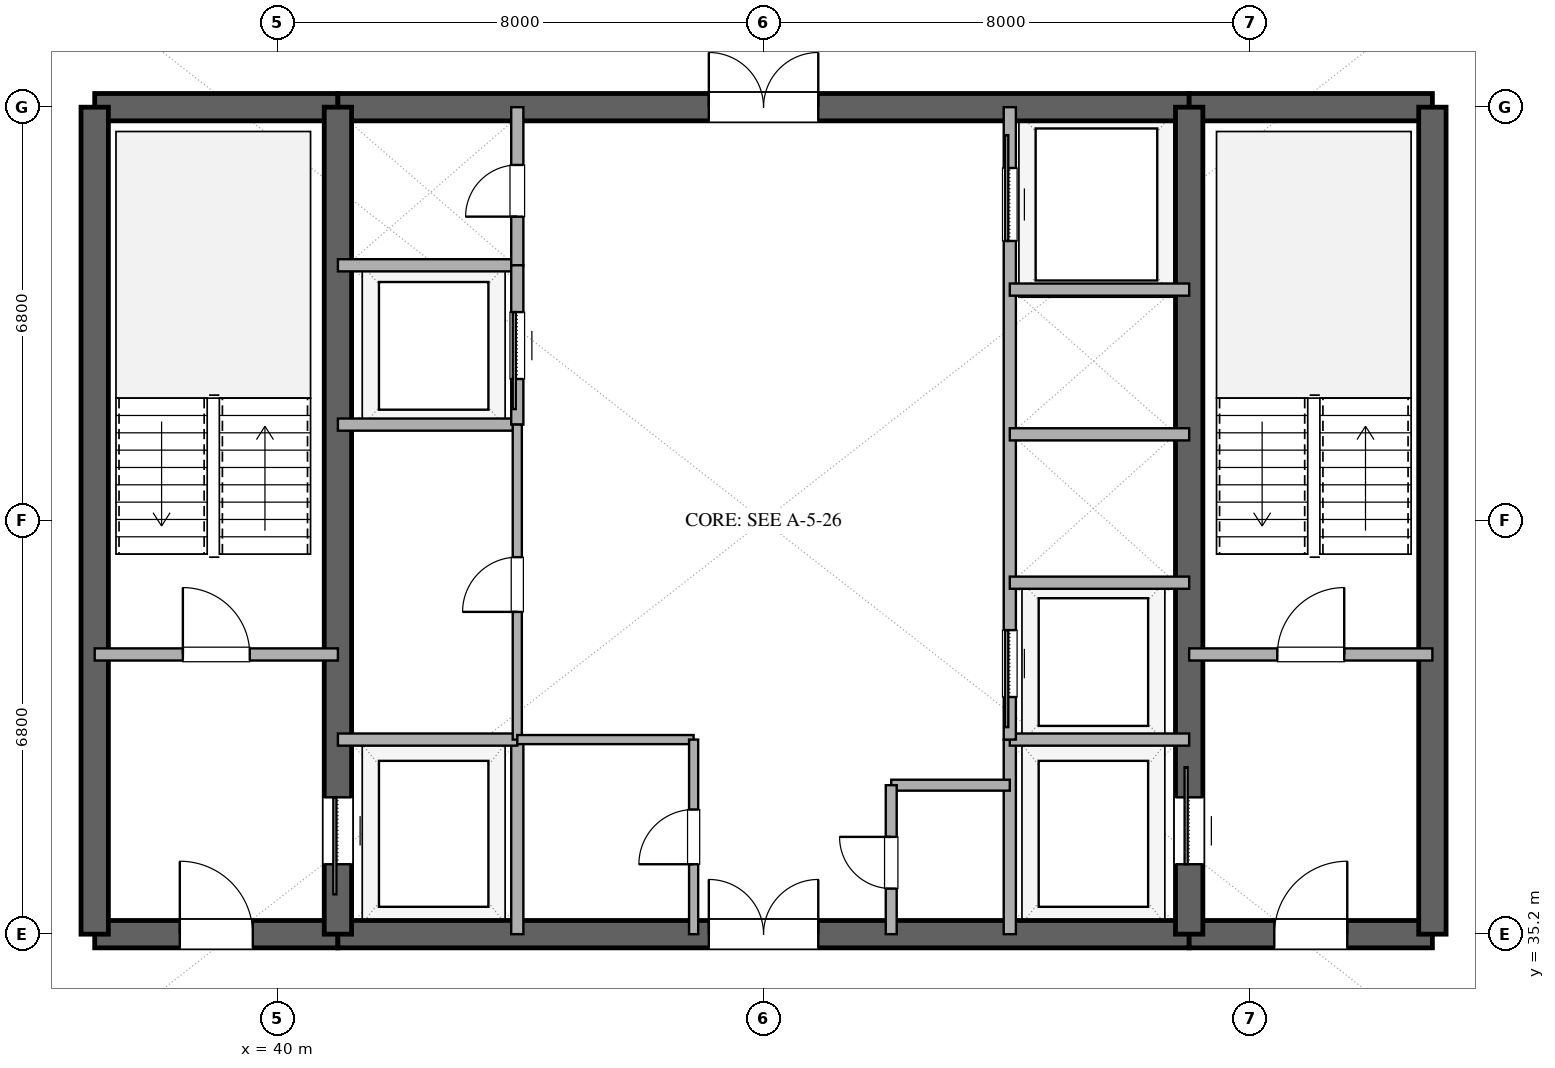
"""IFC4 building model, lengths in metres.
Left out: names, types, materials, properties, quantities, classifications, styles, units other than length and angle.
Written with IfcOpenShell. Run it as: python <this file> out.ifc"""

import sys

from ifc_helpers import new_model, si_unit, direction, frame, frame_2d, origin, place, context, subcontext, project, spatial, rectangle, extrude, element, fill, save


model = new_model("IFC4")
c1 = context("Model", 3, precision=1e-05, world=origin(), true_north=direction((0.0, 1.0)))
c2 = subcontext(c1, "Body", "Model", "MODEL_VIEW")
j1 = project(units=[si_unit("LENGTHUNIT", "METRE"), si_unit("PLANEANGLEUNIT", "RADIAN")], contexts=[c1])
p1 = place(None, origin())
s1 = spatial("IfcSite", under=j1, at=p1, CompositionType="ELEMENT")
p2 = place(p1, origin())
s2 = spatial("IfcBuilding", under=s1, at=p2, CompositionType="ELEMENT")
p3 = place(p2, frame((0.0, 0.0, 161.4)))
s3 = spatial("IfcBuildingStorey", under=s2, at=p3, CompositionType="ELEMENT", Elevation=161.4)
p4 = place(p3, frame((37.0, 35.2, 0.0), z_axis=(0.0, 0.0, 1.0), x_axis=(1.0, 0.0, 0.0)))
e1 = element("IfcWall", 1, at=p4, inside=s3, PredefinedType="SHEAR", context=c2, shape_type="SweptSolid", body=[
    extrude(rectangle(XDim=4.0, YDim=0.45, at=frame_2d((2.0, 0.0))), origin(), (0.0, 0.0, 1.0), 3.38),
])
p5 = place(p4, frame((1.4, 0.0, 0.0)))
e2 = element("IfcOpeningElement", 2, at=p5, cuts=e1, PredefinedType="OPENING", context=c2, shape_type="SweptSolid", body=[
    extrude(rectangle(XDim=1.2, YDim=2.15, at=frame_2d((0.6, 1.075))), frame((0.0, 0.235, 0.0), z_axis=(0.0, -1.0, 0.0), x_axis=(1.0, 0.0, 0.0)), (0.0, 0.0, 1.0), 0.47),
])
p6 = place(p3, frame((41.0, 35.2, 0.0), z_axis=(0.0, 0.0, 1.0), x_axis=(1.0, 0.0, 0.0)))
e3 = element("IfcWall", 3, at=p6, inside=s3, PredefinedType="SHEAR", context=c2, shape_type="SweptSolid", body=[
    extrude(rectangle(XDim=14.0, YDim=0.45, at=frame_2d((7.0, 0.0))), origin(), (0.0, 0.0, 1.0), 3.38),
])
p7 = place(p6, frame((6.1, 0.0, 0.0)))
e4 = element("IfcOpeningElement", 4, at=p7, cuts=e3, PredefinedType="OPENING", context=c2, shape_type="SweptSolid", body=[
    extrude(rectangle(XDim=1.8, YDim=2.25, at=frame_2d((0.9, 1.125))), frame((0.0, 0.235, 0.0), z_axis=(0.0, -1.0, 0.0), x_axis=(1.0, 0.0, 0.0)), (0.0, 0.0, 1.0), 0.47),
])
p8 = place(p3, frame((55.0, 35.2, 0.0), z_axis=(0.0, 0.0, 1.0), x_axis=(1.0, 0.0, 0.0)))
e5 = element("IfcWall", 5, at=p8, inside=s3, PredefinedType="SHEAR", context=c2, shape_type="SweptSolid", body=[
    extrude(rectangle(XDim=4.0, YDim=0.45, at=frame_2d((2.0, 0.0))), origin(), (0.0, 0.0, 1.0), 3.38),
])
p9 = place(p8, frame((1.4, 0.0, 0.0)))
e6 = element("IfcOpeningElement", 6, at=p9, cuts=e5, PredefinedType="OPENING", context=c2, shape_type="SweptSolid", body=[
    extrude(rectangle(XDim=1.2, YDim=2.15, at=frame_2d((0.6, 1.075))), frame((0.0, 0.235, 0.0), z_axis=(0.0, -1.0, 0.0), x_axis=(1.0, 0.0, 0.0)), (0.0, 0.0, 1.0), 0.47),
])
p10 = place(p3, frame((37.0, 48.8, 0.0), z_axis=(0.0, 0.0, 1.0), x_axis=(1.0, 0.0, 0.0)))
e7 = element("IfcWall", 7, at=p10, inside=s3, PredefinedType="SHEAR", context=c2, shape_type="SweptSolid", body=[
    extrude(rectangle(XDim=4.0, YDim=0.45, at=frame_2d((2.0, 0.0))), origin(), (0.0, 0.0, 1.0), 3.38),
])
p11 = place(p3, frame((41.0, 48.8, 0.0), z_axis=(0.0, 0.0, 1.0), x_axis=(1.0, 0.0, 0.0)))
e8 = element("IfcWall", 8, at=p11, inside=s3, PredefinedType="SHEAR", context=c2, shape_type="SweptSolid", body=[
    extrude(rectangle(XDim=14.0, YDim=0.45, at=frame_2d((7.0, 0.0))), origin(), (0.0, 0.0, 1.0), 3.38),
])
p12 = place(p11, frame((6.1, 0.0, 0.0)))
e9 = element("IfcOpeningElement", 9, at=p12, cuts=e8, PredefinedType="OPENING", context=c2, shape_type="SweptSolid", body=[
    extrude(rectangle(XDim=1.8, YDim=2.25, at=frame_2d((0.9, 1.125))), frame((0.0, 0.235, 0.0), z_axis=(0.0, -1.0, 0.0), x_axis=(1.0, 0.0, 0.0)), (0.0, 0.0, 1.0), 0.47),
])
p13 = place(p3, frame((55.0, 48.8, 0.0), z_axis=(0.0, 0.0, 1.0), x_axis=(1.0, 0.0, 0.0)))
e10 = element("IfcWall", 10, at=p13, inside=s3, PredefinedType="SHEAR", context=c2, shape_type="SweptSolid", body=[
    extrude(rectangle(XDim=4.0, YDim=0.45, at=frame_2d((2.0, 0.0))), origin(), (0.0, 0.0, 1.0), 3.38),
])
for number, where, z_axis, x_axis in (
    (11, (37.0, 35.2, 0.0), (0.0, 0.0, 1.0), (0.0, 1.0, 0.0)),
    (12, (59.0, 35.2, 0.0), (0.0, 0.0, 1.0), (0.0, 1.0, 0.0)),
):
    element("IfcWall", number, at=place(p3, frame(where, z_axis=z_axis, x_axis=x_axis)), inside=s3, PredefinedType="SHEAR", context=c2, shape_type="SweptSolid", body=[
        extrude(rectangle(XDim=13.6, YDim=0.45, at=frame_2d((6.8, 0.0))), origin(), (0.0, 0.0, 1.0), 3.38),
    ])
p14 = place(p3, frame((41.0, 35.2, 0.0), z_axis=(0.0, 0.0, 1.0), x_axis=(0.0, 1.0, 0.0)))
e13 = element("IfcWall", 13, at=p14, inside=s3, PredefinedType="SHEAR", context=c2, shape_type="SweptSolid", body=[
    extrude(rectangle(XDim=13.6, YDim=0.45, at=frame_2d((6.8, 0.0))), origin(), (0.0, 0.0, 1.0), 3.38),
])
p15 = place(p14, frame((1.15, 0.0, 0.0)))
e14 = element("IfcOpeningElement", 14, at=p15, cuts=e13, PredefinedType="OPENING", context=c2, shape_type="SweptSolid", body=[
    extrude(rectangle(XDim=1.1, YDim=2.2, at=frame_2d((0.55, 1.1))), frame((0.0, 0.235, 0.0), z_axis=(0.0, -1.0, 0.0), x_axis=(1.0, 0.0, 0.0)), (0.0, 0.0, 1.0), 0.47),
])
p16 = place(p3, frame((55.0, 35.2, 0.0), z_axis=(0.0, 0.0, 1.0), x_axis=(0.0, 1.0, 0.0)))
e15 = element("IfcWall", 15, at=p16, inside=s3, PredefinedType="SHEAR", context=c2, shape_type="SweptSolid", body=[
    extrude(rectangle(XDim=13.6, YDim=0.45, at=frame_2d((6.8, 0.0))), origin(), (0.0, 0.0, 1.0), 3.38),
])
p17 = place(p16, frame((1.15, 0.0, 0.0)))
e16 = element("IfcOpeningElement", 16, at=p17, cuts=e15, PredefinedType="OPENING", context=c2, shape_type="SweptSolid", body=[
    extrude(rectangle(XDim=1.1, YDim=2.2, at=frame_2d((0.55, 1.1))), frame((0.0, 0.235, 0.0), z_axis=(0.0, -1.0, 0.0), x_axis=(1.0, 0.0, 0.0)), (0.0, 0.0, 1.0), 0.47),
])
p18 = place(p3, frame((37.0, 39.8, 0.0), z_axis=(0.0, 0.0, 1.0), x_axis=(1.0, 0.0, 0.0)))
e17 = element("IfcWall", 17, at=p18, inside=s3, PredefinedType="SOLIDWALL", context=c2, shape_type="SweptSolid", body=[
    extrude(rectangle(XDim=4.0, YDim=0.2, at=frame_2d((2.0, 0.0))), origin(), (0.0, 0.0, 1.0), 2.74),
])
p19 = place(p18, frame((1.45, 0.0, 0.0)))
e18 = element("IfcOpeningElement", 18, at=p19, cuts=e17, PredefinedType="OPENING", context=c2, shape_type="SweptSolid", body=[
    extrude(rectangle(XDim=1.1, YDim=2.15, at=frame_2d((0.55, 1.075))), frame((0.0, 0.11, 0.0), z_axis=(0.0, -1.0, 0.0), x_axis=(1.0, 0.0, 0.0)), (0.0, 0.0, 1.0), 0.22),
])
p20 = place(p3, frame((55.0, 39.8, 0.0), z_axis=(0.0, 0.0, 1.0), x_axis=(1.0, 0.0, 0.0)))
e19 = element("IfcWall", 19, at=p20, inside=s3, PredefinedType="SOLIDWALL", context=c2, shape_type="SweptSolid", body=[
    extrude(rectangle(XDim=4.0, YDim=0.2, at=frame_2d((2.0, 0.0))), origin(), (0.0, 0.0, 1.0), 2.74),
])
p21 = place(p20, frame((1.45, 0.0, 0.0)))
e20 = element("IfcOpeningElement", 20, at=p21, cuts=e19, PredefinedType="OPENING", context=c2, shape_type="SweptSolid", body=[
    extrude(rectangle(XDim=1.1, YDim=2.15, at=frame_2d((0.55, 1.075))), frame((0.0, 0.11, 0.0), z_axis=(0.0, -1.0, 0.0), x_axis=(1.0, 0.0, 0.0)), (0.0, 0.0, 1.0), 0.22),
])
p22 = place(p3, frame((43.95, 35.2, 0.0), z_axis=(0.0, 0.0, 1.0), x_axis=(0.0, 1.0, 0.0)))
e21 = element("IfcWall", 21, at=p22, inside=s3, PredefinedType="SOLIDWALL", context=c2, shape_type="SweptSolid", body=[
    extrude(rectangle(XDim=3.2, YDim=0.2, at=frame_2d((1.6, 0.0))), origin(), (0.0, 0.0, 1.0), 2.74),
])
p23 = place(p3, frame((41.0, 38.4, 0.0), z_axis=(0.0, 0.0, 1.0), x_axis=(1.0, 0.0, 0.0)))
e22 = element("IfcWall", 22, at=p23, inside=s3, PredefinedType="SOLIDWALL", context=c2, shape_type="SweptSolid", body=[
    extrude(rectangle(XDim=2.95, YDim=0.2, at=frame_2d((1.475, 0.0))), origin(), (0.0, 0.0, 1.0), 2.74),
])
p24 = place(p3, frame((52.05, 35.2, 0.0), z_axis=(0.0, 0.0, 1.0), x_axis=(0.0, 1.0, 0.0)))
e23 = element("IfcWall", 23, at=p24, inside=s3, PredefinedType="SOLIDWALL", context=c2, shape_type="SweptSolid", body=[
    extrude(rectangle(XDim=3.2, YDim=0.2, at=frame_2d((1.6, 0.0))), origin(), (0.0, 0.0, 1.0), 2.74),
])
for number, where, z_axis, x_axis in (
    (24, (52.05, 38.4, 0.0), (0.0, 0.0, 1.0), (1.0, 0.0, 0.0)),
    (25, (41.0, 46.2, 0.0), (0.0, 0.0, 1.0), (1.0, 0.0, 0.0)),
):
    element("IfcWall", number, at=place(p3, frame(where, z_axis=z_axis, x_axis=x_axis)), inside=s3, PredefinedType="SOLIDWALL", context=c2, shape_type="SweptSolid", body=[
        extrude(rectangle(XDim=2.95, YDim=0.2, at=frame_2d((1.475, 0.0))), origin(), (0.0, 0.0, 1.0), 2.74),
    ])
p25 = place(p3, frame((43.95, 46.2, 0.0), z_axis=(0.0, 0.0, 1.0), x_axis=(0.0, 1.0, 0.0)))
e26 = element("IfcWall", 26, at=p25, inside=s3, PredefinedType="SOLIDWALL", context=c2, shape_type="SweptSolid", body=[
    extrude(rectangle(XDim=2.6, YDim=0.2, at=frame_2d((1.3, 0.0))), origin(), (0.0, 0.0, 1.0), 2.74),
])
p26 = place(p25, frame((0.8, 0.0, 0.0)))
e27 = element("IfcOpeningElement", 27, at=p26, cuts=e26, PredefinedType="OPENING", context=c2, shape_type="SweptSolid", body=[
    extrude(rectangle(XDim=0.85, YDim=2.15, at=frame_2d((0.425, 1.075))), frame((0.0, 0.11, 0.0), z_axis=(0.0, -1.0, 0.0), x_axis=(1.0, 0.0, 0.0)), (0.0, 0.0, 1.0), 0.22),
])
p27 = place(p3, frame((41.0, 43.58, 0.0), z_axis=(0.0, 0.0, 1.0), x_axis=(1.0, 0.0, 0.0)))
e28 = element("IfcWall", 28, at=p27, inside=s3, PredefinedType="SOLIDWALL", context=c2, shape_type="SweptSolid", body=[
    extrude(rectangle(XDim=2.95, YDim=0.2, at=frame_2d((1.475, 0.0))), origin(), (0.0, 0.0, 1.0), 2.74),
])
p28 = place(p3, frame((43.95, 43.58, 0.0), z_axis=(0.0, 0.0, 1.0), x_axis=(0.0, 1.0, 0.0)))
e29 = element("IfcWall", 29, at=p28, inside=s3, PredefinedType="SOLIDWALL", context=c2, shape_type="SweptSolid", body=[
    extrude(rectangle(XDim=2.62, YDim=0.2, at=frame_2d((1.31, 0.0))), origin(), (0.0, 0.0, 1.0), 2.74),
])
p29 = place(p28, frame((0.75, 0.0, 0.0)))
e30 = element("IfcOpeningElement", 30, at=p29, cuts=e29, PredefinedType="OPENING", context=c2, shape_type="SweptSolid", body=[
    extrude(rectangle(XDim=1.1, YDim=2.2, at=frame_2d((0.55, 1.1))), frame((0.0, 0.11, 0.0), z_axis=(0.0, -1.0, 0.0), x_axis=(1.0, 0.0, 0.0)), (0.0, 0.0, 1.0), 0.22),
])
p30 = place(p3, frame((43.95, 38.4, 0.0), z_axis=(0.0, 0.0, 1.0), x_axis=(0.0, 1.0, 0.0)))
e31 = element("IfcWall", 31, at=p30, inside=s3, PredefinedType="PARTITIONING", context=c2, shape_type="SweptSolid", body=[
    extrude(rectangle(XDim=5.18, YDim=0.15, at=frame_2d((2.59, 0.0))), origin(), (0.0, 0.0, 1.0), 2.74),
])
p31 = place(p30, frame((2.1, 0.0, 0.0)))
e32 = element("IfcOpeningElement", 32, at=p31, cuts=e31, PredefinedType="OPENING", context=c2, shape_type="SweptSolid", body=[
    extrude(rectangle(XDim=0.9, YDim=2.15, at=frame_2d((0.45, 1.075))), frame((0.0, 0.085, 0.0), z_axis=(0.0, -1.0, 0.0), x_axis=(1.0, 0.0, 0.0)), (0.0, 0.0, 1.0), 0.17),
])
p32 = place(p3, frame((52.05, 38.4, 0.0), z_axis=(0.0, 0.0, 1.0), x_axis=(0.0, 1.0, 0.0)))
e33 = element("IfcWall", 33, at=p32, inside=s3, PredefinedType="SOLIDWALL", context=c2, shape_type="SweptSolid", body=[
    extrude(rectangle(XDim=10.4, YDim=0.2, at=frame_2d((5.2, 0.0))), origin(), (0.0, 0.0, 1.0), 2.74),
])
p33 = place(p32, frame((0.7, 0.0, 0.0)))
e34 = element("IfcOpeningElement", 34, at=p33, cuts=e33, PredefinedType="OPENING", context=c2, shape_type="SweptSolid", body=[
    extrude(rectangle(XDim=1.1, YDim=2.2, at=frame_2d((0.55, 1.1))), frame((0.0, 0.11, 0.0), z_axis=(0.0, -1.0, 0.0), x_axis=(1.0, 0.0, 0.0)), (0.0, 0.0, 1.0), 0.22),
])
p34 = place(p32, frame((8.2, 0.0, 0.0)))
e35 = element("IfcOpeningElement", 35, at=p34, cuts=e33, PredefinedType="OPENING", context=c2, shape_type="SweptSolid", body=[
    extrude(rectangle(XDim=1.2, YDim=2.2, at=frame_2d((0.6, 1.1))), frame((0.0, 0.11, 0.0), z_axis=(0.0, -1.0, 0.0), x_axis=(1.0, 0.0, 0.0)), (0.0, 0.0, 1.0), 0.22),
])
for number, where, z_axis, x_axis in (
    (36, (52.05, 40.98, 0.0), (0.0, 0.0, 1.0), (1.0, 0.0, 0.0)),
    (37, (52.05, 43.42, 0.0), (0.0, 0.0, 1.0), (1.0, 0.0, 0.0)),
    (38, (52.05, 45.8, 0.0), (0.0, 0.0, 1.0), (1.0, 0.0, 0.0)),
):
    element("IfcWall", number, at=place(p3, frame(where, z_axis=z_axis, x_axis=x_axis)), inside=s3, PredefinedType="SOLIDWALL", context=c2, shape_type="SweptSolid", body=[
        extrude(rectangle(XDim=2.95, YDim=0.2, at=frame_2d((1.475, 0.0))), origin(), (0.0, 0.0, 1.0), 2.74),
    ])
p35 = place(p3, frame((43.95, 38.4, 0.0), z_axis=(0.0, 0.0, 1.0), x_axis=(1.0, 0.0, 0.0)))
e39 = element("IfcWall", 39, at=p35, inside=s3, PredefinedType="PARTITIONING", context=c2, shape_type="SweptSolid", body=[
    extrude(rectangle(XDim=2.9, YDim=0.15, at=frame_2d((1.45, 0.0))), origin(), (0.0, 0.0, 1.0), 2.74),
])
p36 = place(p3, frame((46.85, 35.2, 0.0), z_axis=(0.0, 0.0, 1.0), x_axis=(0.0, 1.0, 0.0)))
e40 = element("IfcWall", 40, at=p36, inside=s3, PredefinedType="PARTITIONING", context=c2, shape_type="SweptSolid", body=[
    extrude(rectangle(XDim=3.2, YDim=0.15, at=frame_2d((1.6, 0.0))), origin(), (0.0, 0.0, 1.0), 2.74),
])
p37 = place(p36, frame((1.15, 0.0, 0.0)))
e41 = element("IfcOpeningElement", 41, at=p37, cuts=e40, PredefinedType="OPENING", context=c2, shape_type="SweptSolid", body=[
    extrude(rectangle(XDim=0.9, YDim=2.15, at=frame_2d((0.45, 1.075))), frame((0.0, 0.085, 0.0), z_axis=(0.0, -1.0, 0.0), x_axis=(1.0, 0.0, 0.0)), (0.0, 0.0, 1.0), 0.17),
])
p38 = place(p3, frame((50.1, 37.65, 0.0), z_axis=(0.0, 0.0, 1.0), x_axis=(1.0, 0.0, 0.0)))
e42 = element("IfcWall", 42, at=p38, inside=s3, PredefinedType="PLUMBINGWALL", context=c2, shape_type="SweptSolid", body=[
    extrude(rectangle(XDim=1.95, YDim=0.18, at=frame_2d((0.975, 0.0))), origin(), (0.0, 0.0, 1.0), 2.74),
])
p39 = place(p3, frame((50.1, 35.2, 0.0), z_axis=(0.0, 0.0, 1.0), x_axis=(0.0, 1.0, 0.0)))
e43 = element("IfcWall", 43, at=p39, inside=s3, PredefinedType="PLUMBINGWALL", context=c2, shape_type="SweptSolid", body=[
    extrude(rectangle(XDim=2.45, YDim=0.18, at=frame_2d((1.225, 0.0))), origin(), (0.0, 0.0, 1.0), 2.74),
])
p40 = place(p39, frame((0.75, 0.0, 0.0)))
e44 = element("IfcOpeningElement", 44, at=p40, cuts=e43, PredefinedType="OPENING", context=c2, shape_type="SweptSolid", body=[
    extrude(rectangle(XDim=0.85, YDim=2.1, at=frame_2d((0.425, 1.05))), frame((0.0, 0.1, 0.0), z_axis=(0.0, -1.0, 0.0), x_axis=(1.0, 0.0, 0.0)), (0.0, 0.0, 1.0), 0.2),
])
p41 = place(p15, origin())
e45 = element("IfcDoor", 45, at=p41, inside=s3, OperationType="SLIDING_TO_LEFT", PredefinedType="DOOR", context=c2, shape_type="SweptSolid", body=[
    extrude(rectangle(XDim=1.1, YDim=2.2, at=frame_2d((0.55, 1.1))), frame((0.0, 0.025, 0.0), z_axis=(0.0, -1.0, 0.0), x_axis=(1.0, 0.0, 0.0)), (0.0, 0.0, 1.0), 0.05),
])
fill(e14, e45)
p42 = place(p17, origin())
e46 = element("IfcDoor", 46, at=p42, inside=s3, OperationType="SLIDING_TO_RIGHT", PredefinedType="DOOR", context=c2, shape_type="SweptSolid", body=[
    extrude(rectangle(XDim=1.1, YDim=2.2, at=frame_2d((0.55, 1.1))), frame((0.0, 0.025, 0.0), z_axis=(0.0, -1.0, 0.0), x_axis=(1.0, 0.0, 0.0)), (0.0, 0.0, 1.0), 0.05),
])
fill(e16, e46)
p43 = place(p5, origin())
e47 = element("IfcDoor", 47, at=p43, inside=s3, OperationType="SINGLE_SWING_LEFT", PredefinedType="DOOR", context=c2, shape_type="SweptSolid", body=[
    extrude(rectangle(XDim=1.2, YDim=2.15, at=frame_2d((0.6, 1.075))), frame((0.0, 0.025, 0.0), z_axis=(0.0, -1.0, 0.0), x_axis=(1.0, 0.0, 0.0)), (0.0, 0.0, 1.0), 0.05),
])
fill(e2, e47)
p44 = place(p9, origin())
e48 = element("IfcDoor", 48, at=p44, inside=s3, OperationType="SINGLE_SWING_RIGHT", PredefinedType="DOOR", context=c2, shape_type="SweptSolid", body=[
    extrude(rectangle(XDim=1.2, YDim=2.15, at=frame_2d((0.6, 1.075))), frame((0.0, 0.025, 0.0), z_axis=(0.0, -1.0, 0.0), x_axis=(1.0, 0.0, 0.0)), (0.0, 0.0, 1.0), 0.05),
])
fill(e6, e48)
p45 = place(p7, origin())
e49 = element("IfcDoor", 49, at=p45, inside=s3, OperationType="DOUBLE_DOOR_SINGLE_SWING", PredefinedType="DOOR", context=c2, shape_type="SweptSolid", body=[
    extrude(rectangle(XDim=1.8, YDim=2.25, at=frame_2d((0.9, 1.125))), frame((0.0, 0.025, 0.0), z_axis=(0.0, -1.0, 0.0), x_axis=(1.0, 0.0, 0.0)), (0.0, 0.0, 1.0), 0.05),
])
fill(e4, e49)
p46 = place(p12, origin())
e50 = element("IfcDoor", 50, at=p46, inside=s3, OperationType="DOUBLE_DOOR_SINGLE_SWING", PredefinedType="DOOR", context=c2, shape_type="SweptSolid", body=[
    extrude(rectangle(XDim=1.8, YDim=2.25, at=frame_2d((0.9, 1.125))), frame((0.0, 0.025, 0.0), z_axis=(0.0, -1.0, 0.0), x_axis=(1.0, 0.0, 0.0)), (0.0, 0.0, 1.0), 0.05),
])
fill(e9, e50)
p47 = place(p19, origin())
e51 = element("IfcDoor", 51, at=p47, inside=s3, OperationType="SINGLE_SWING_LEFT", PredefinedType="DOOR", context=c2, shape_type="SweptSolid", body=[
    extrude(rectangle(XDim=1.1, YDim=2.15, at=frame_2d((0.55, 1.075))), frame((0.0, 0.025, 0.0), z_axis=(0.0, -1.0, 0.0), x_axis=(1.0, 0.0, 0.0)), (0.0, 0.0, 1.0), 0.05),
])
fill(e18, e51)
p48 = place(p21, origin())
e52 = element("IfcDoor", 52, at=p48, inside=s3, OperationType="SINGLE_SWING_RIGHT", PredefinedType="DOOR", context=c2, shape_type="SweptSolid", body=[
    extrude(rectangle(XDim=1.1, YDim=2.15, at=frame_2d((0.55, 1.075))), frame((0.0, 0.025, 0.0), z_axis=(0.0, -1.0, 0.0), x_axis=(1.0, 0.0, 0.0)), (0.0, 0.0, 1.0), 0.05),
])
fill(e20, e52)
p49 = place(p26, origin())
e53 = element("IfcDoor", 53, at=p49, inside=s3, OperationType="SINGLE_SWING_LEFT", PredefinedType="DOOR", context=c2, shape_type="SweptSolid", body=[
    extrude(rectangle(XDim=0.85, YDim=2.15, at=frame_2d((0.425, 1.075))), frame((0.0, 0.025, 0.0), z_axis=(0.0, -1.0, 0.0), x_axis=(1.0, 0.0, 0.0)), (0.0, 0.0, 1.0), 0.05),
])
fill(e27, e53)
p50 = place(p29, origin())
e54 = element("IfcDoor", 54, at=p50, inside=s3, OperationType="SLIDING_TO_LEFT", PredefinedType="DOOR", context=c2, shape_type="SweptSolid", body=[
    extrude(rectangle(XDim=1.1, YDim=2.2, at=frame_2d((0.55, 1.1))), frame((0.0, 0.025, 0.0), z_axis=(0.0, -1.0, 0.0), x_axis=(1.0, 0.0, 0.0)), (0.0, 0.0, 1.0), 0.05),
])
fill(e30, e54)
p51 = place(p31, origin())
e55 = element("IfcDoor", 55, at=p51, inside=s3, OperationType="SINGLE_SWING_LEFT", PredefinedType="DOOR", context=c2, shape_type="SweptSolid", body=[
    extrude(rectangle(XDim=0.9, YDim=2.15, at=frame_2d((0.45, 1.075))), frame((0.0, 0.025, 0.0), z_axis=(0.0, -1.0, 0.0), x_axis=(1.0, 0.0, 0.0)), (0.0, 0.0, 1.0), 0.05),
])
fill(e32, e55)
p52 = place(p33, origin())
e56 = element("IfcDoor", 56, at=p52, inside=s3, OperationType="SLIDING_TO_LEFT", PredefinedType="DOOR", context=c2, shape_type="SweptSolid", body=[
    extrude(rectangle(XDim=1.1, YDim=2.2, at=frame_2d((0.55, 1.1))), frame((0.0, 0.025, 0.0), z_axis=(0.0, -1.0, 0.0), x_axis=(1.0, 0.0, 0.0)), (0.0, 0.0, 1.0), 0.05),
])
fill(e34, e56)
p53 = place(p34, origin())
e57 = element("IfcDoor", 57, at=p53, inside=s3, OperationType="SLIDING_TO_RIGHT", PredefinedType="DOOR", context=c2, shape_type="SweptSolid", body=[
    extrude(rectangle(XDim=1.2, YDim=2.2, at=frame_2d((0.6, 1.1))), frame((0.0, 0.025, 0.0), z_axis=(0.0, -1.0, 0.0), x_axis=(1.0, 0.0, 0.0)), (0.0, 0.0, 1.0), 0.05),
])
fill(e35, e57)
p54 = place(p37, origin())
e58 = element("IfcDoor", 58, at=p54, inside=s3, OperationType="SINGLE_SWING_LEFT", PredefinedType="DOOR", context=c2, shape_type="SweptSolid", body=[
    extrude(rectangle(XDim=0.9, YDim=2.15, at=frame_2d((0.45, 1.075))), frame((0.0, 0.025, 0.0), z_axis=(0.0, -1.0, 0.0), x_axis=(1.0, 0.0, 0.0)), (0.0, 0.0, 1.0), 0.05),
])
fill(e41, e58)
p55 = place(p40, origin())
e59 = element("IfcDoor", 59, at=p55, inside=s3, OperationType="SINGLE_SWING_RIGHT", PredefinedType="DOOR", context=c2, shape_type="SweptSolid", body=[
    extrude(rectangle(XDim=0.85, YDim=2.1, at=frame_2d((0.425, 1.05))), frame((0.0, 0.025, 0.0), z_axis=(0.0, -1.0, 0.0), x_axis=(1.0, 0.0, 0.0)), (0.0, 0.0, 1.0), 0.05),
])
fill(e44, e59)
save(model, sys.argv[1])
